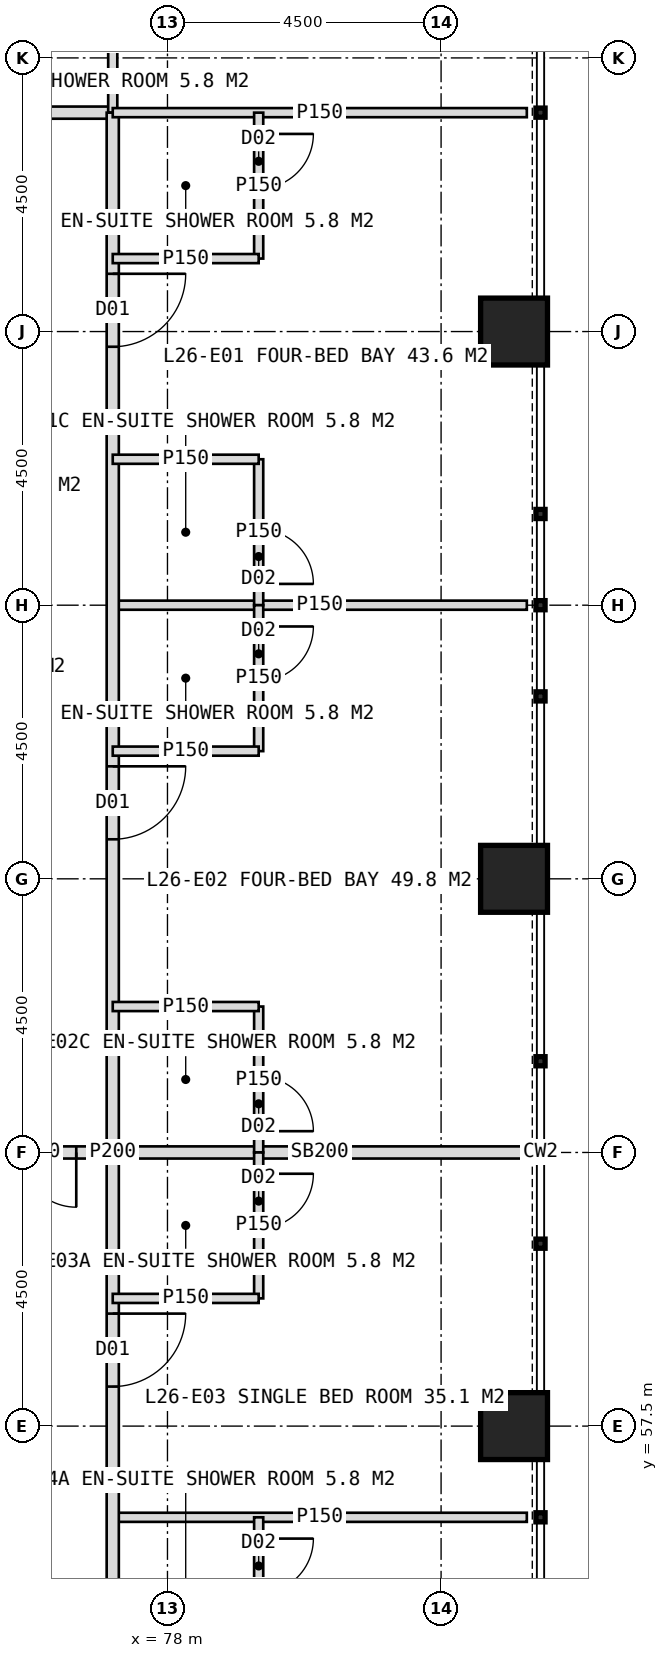
"""IFC4 building model, lengths in metres.
Left out: names, types, materials, properties, quantities, classifications, styles, units other than length and angle.
Written with IfcOpenShell. Run it as: python <this file> out.ifc"""

import sys

from ifc_helpers import new_model, si_unit, direction, frame, frame_2d, origin, origin_2d, place, context, subcontext, project, spatial, rectangle, hollow_rectangle, extrude, element, fill, save


model = new_model("IFC4")
c1 = context("Model", 3, precision=1e-05, world=origin(), true_north=direction((0.0, 1.0)))
c2 = subcontext(c1, "Body", "Model", "MODEL_VIEW")
j1 = project(units=[si_unit("LENGTHUNIT", "METRE"), si_unit("PLANEANGLEUNIT", "RADIAN")], contexts=[c1])
p1 = place(None, origin())
s1 = spatial("IfcSite", under=j1, at=p1, CompositionType="ELEMENT")
p2 = place(p1, origin())
s2 = spatial("IfcBuilding", under=s1, at=p2, CompositionType="ELEMENT")
p3 = place(p2, frame((0.0, 0.0, 112.0)))
s3 = spatial("IfcBuildingStorey", under=s2, at=p3, CompositionType="ELEMENT", Elevation=112.0)
for number, where, z_axis, x_axis in (
    (1, (83.7, 57.5, 0.0), (0.0, 0.0, 1.0), (1.0, 0.0, 0.0)),
    (2, (83.7, 66.5, 0.0), (0.0, 0.0, 1.0), (1.0, 0.0, 0.0)),
    (3, (83.7, 75.5, 0.0), (0.0, 0.0, 1.0), (1.0, 0.0, 0.0)),
):
    element("IfcColumn", number, at=place(p3, frame(where, z_axis=z_axis, x_axis=x_axis)), inside=s3, PredefinedType="COLUMN", context=c2, shape_type="SweptSolid", body=[
        extrude(hollow_rectangle(XDim=1.1, YDim=1.1, WallThickness=0.1, at=origin_2d()), origin(), (0.0, 0.0, 1.0), 4.0),
    ])
p4 = place(p3, frame((42.9, 79.1, 0.0), z_axis=(0.0, 0.0, 1.0), x_axis=(1.0, 0.0, 0.0)))
e4 = element("IfcWall", 4, at=p4, inside=s3, PredefinedType="PARTITIONING", context=c2, shape_type="SweptSolid", body=[
    extrude(rectangle(XDim=34.2, YDim=0.2, at=frame_2d((17.1, 0.0))), origin(), (0.0, 0.0, 1.0), 3.75),
])
p5 = place(p4, frame((3.25, 0.0, 0.0)))
e5 = element("IfcOpeningElement", 5, at=p5, cuts=e4, PredefinedType="OPENING", context=c2, shape_type="SweptSolid", body=[
    extrude(rectangle(XDim=1.2, YDim=2.2, at=frame_2d((0.6, 1.1))), frame((0.0, 0.11, 0.0), z_axis=(0.0, -1.0, 0.0), x_axis=(1.0, 0.0, 0.0)), (0.0, 0.0, 1.0), 0.22),
])
p6 = place(p4, frame((9.25, 0.0, 0.0)))
e6 = element("IfcOpeningElement", 6, at=p6, cuts=e4, PredefinedType="OPENING", context=c2, shape_type="SweptSolid", body=[
    extrude(rectangle(XDim=1.2, YDim=2.2, at=frame_2d((0.6, 1.1))), frame((0.0, 0.11, 0.0), z_axis=(0.0, -1.0, 0.0), x_axis=(1.0, 0.0, 0.0)), (0.0, 0.0, 1.0), 0.22),
])
p7 = place(p4, frame((13.75, 0.0, 0.0)))
e7 = element("IfcOpeningElement", 7, at=p7, cuts=e4, PredefinedType="OPENING", context=c2, shape_type="SweptSolid", body=[
    extrude(rectangle(XDim=1.2, YDim=2.2, at=frame_2d((0.6, 1.1))), frame((0.0, 0.11, 0.0), z_axis=(0.0, -1.0, 0.0), x_axis=(1.0, 0.0, 0.0)), (0.0, 0.0, 1.0), 0.22),
])
p8 = place(p4, frame((19.6, 0.0, 0.0)))
e8 = element("IfcOpeningElement", 8, at=p8, cuts=e4, PredefinedType="OPENING", context=c2, shape_type="SweptSolid", body=[
    extrude(rectangle(XDim=1.0, YDim=2.1, at=frame_2d((0.5, 1.05))), frame((0.0, 0.11, 0.0), z_axis=(0.0, -1.0, 0.0), x_axis=(1.0, 0.0, 0.0)), (0.0, 0.0, 1.0), 0.22),
])
p9 = place(p4, frame((27.25, 0.0, 0.0)))
e9 = element("IfcOpeningElement", 9, at=p9, cuts=e4, PredefinedType="OPENING", context=c2, shape_type="SweptSolid", body=[
    extrude(rectangle(XDim=1.2, YDim=2.2, at=frame_2d((0.6, 1.1))), frame((0.0, 0.11, 0.0), z_axis=(0.0, -1.0, 0.0), x_axis=(1.0, 0.0, 0.0)), (0.0, 0.0, 1.0), 0.22),
])
p10 = place(p3, frame((77.1, 79.1, 0.0), z_axis=(0.0, 0.0, 1.0), x_axis=(0.0, 1.0, 0.0)))
e10 = element("IfcWall", 10, at=p10, inside=s3, PredefinedType="PARTITIONING", context=c2, shape_type="SweptSolid", body=[
    extrude(rectangle(XDim=2.4, YDim=0.15, at=frame_2d((1.2, 0.0))), origin(), (0.0, 0.0, 1.0), 3.75),
])
p11 = place(p3, frame((77.1, 71.0, 0.0), z_axis=(0.0, 0.0, 1.0), x_axis=(1.0, 0.0, 0.0)))
e11 = element("IfcWall", 11, at=p11, inside=s3, PredefinedType="PARTITIONING", context=c2, shape_type="SweptSolid", body=[
    extrude(rectangle(XDim=6.81, YDim=0.15, at=frame_2d((3.405, 0.0))), origin(), (0.0, 0.0, 1.0), 3.75),
])
p12 = place(p3, frame((77.1, 62.0, 0.0), z_axis=(0.0, 0.0, 1.0), x_axis=(1.0, 0.0, 0.0)))
e12 = element("IfcWall", 12, at=p12, inside=s3, PredefinedType="SOLIDWALL", context=c2, shape_type="SweptSolid", body=[
    extrude(rectangle(XDim=6.81, YDim=0.2, at=frame_2d((3.405, 0.0))), origin(), (0.0, 0.0, 1.0), 2.95),
])
p13 = place(p3, frame((77.1, 56.0, 0.0), z_axis=(0.0, 0.0, 1.0), x_axis=(1.0, 0.0, 0.0)))
e13 = element("IfcWall", 13, at=p13, inside=s3, PredefinedType="PARTITIONING", context=c2, shape_type="SweptSolid", body=[
    extrude(rectangle(XDim=6.81, YDim=0.15, at=frame_2d((3.405, 0.0))), origin(), (0.0, 0.0, 1.0), 3.75),
])
p14 = place(p3, frame((77.1, 79.1, 0.0), z_axis=(0.0, 0.0, 1.0), x_axis=(0.0, -1.0, 0.0)))
e14 = element("IfcWall", 14, at=p14, inside=s3, PredefinedType="PARTITIONING", context=c2, shape_type="SweptSolid", body=[
    extrude(rectangle(XDim=34.2, YDim=0.2, at=frame_2d((17.1, 0.0))), origin(), (0.0, 0.0, 1.0), 3.75),
])
p15 = place(p14, frame((2.65, 0.0, 0.0)))
e15 = element("IfcOpeningElement", 15, at=p15, cuts=e14, PredefinedType="OPENING", context=c2, shape_type="SweptSolid", body=[
    extrude(rectangle(XDim=1.2, YDim=2.2, at=frame_2d((0.6, 1.1))), frame((0.0, 0.11, 0.0), z_axis=(0.0, -1.0, 0.0), x_axis=(1.0, 0.0, 0.0)), (0.0, 0.0, 1.0), 0.22),
])
p16 = place(p14, frame((10.75, 0.0, 0.0)))
e16 = element("IfcOpeningElement", 16, at=p16, cuts=e14, PredefinedType="OPENING", context=c2, shape_type="SweptSolid", body=[
    extrude(rectangle(XDim=1.2, YDim=2.2, at=frame_2d((0.6, 1.1))), frame((0.0, 0.11, 0.0), z_axis=(0.0, -1.0, 0.0), x_axis=(1.0, 0.0, 0.0)), (0.0, 0.0, 1.0), 0.22),
])
p17 = place(p14, frame((19.75, 0.0, 0.0)))
e17 = element("IfcOpeningElement", 17, at=p17, cuts=e14, PredefinedType="OPENING", context=c2, shape_type="SweptSolid", body=[
    extrude(rectangle(XDim=1.2, YDim=2.2, at=frame_2d((0.6, 1.1))), frame((0.0, 0.11, 0.0), z_axis=(0.0, -1.0, 0.0), x_axis=(1.0, 0.0, 0.0)), (0.0, 0.0, 1.0), 0.22),
])
p18 = place(p14, frame((25.75, 0.0, 0.0)))
e18 = element("IfcOpeningElement", 18, at=p18, cuts=e14, PredefinedType="OPENING", context=c2, shape_type="SweptSolid", body=[
    extrude(rectangle(XDim=1.2, YDim=2.2, at=frame_2d((0.6, 1.1))), frame((0.0, 0.11, 0.0), z_axis=(0.0, -1.0, 0.0), x_axis=(1.0, 0.0, 0.0)), (0.0, 0.0, 1.0), 0.22),
])
p19 = place(p14, frame((30.25, 0.0, 0.0)))
e19 = element("IfcOpeningElement", 19, at=p19, cuts=e14, PredefinedType="OPENING", context=c2, shape_type="SweptSolid", body=[
    extrude(rectangle(XDim=1.2, YDim=2.2, at=frame_2d((0.6, 1.1))), frame((0.0, 0.11, 0.0), z_axis=(0.0, -1.0, 0.0), x_axis=(1.0, 0.0, 0.0)), (0.0, 0.0, 1.0), 0.22),
])
p20 = place(p3, frame((77.1, 79.1, 0.0), z_axis=(0.0, 0.0, 1.0), x_axis=(1.0, 0.0, 0.0)))
e20 = element("IfcWall", 20, at=p20, inside=s3, PredefinedType="PARTITIONING", context=c2, shape_type="SweptSolid", body=[
    extrude(rectangle(XDim=6.81, YDim=0.15, at=frame_2d((3.405, 0.0))), origin(), (0.0, 0.0, 1.0), 3.75),
])
p21 = place(p3, frame((79.5, 79.1, 0.0), z_axis=(0.0, 0.0, 1.0), x_axis=(0.0, -1.0, 0.0)))
e21 = element("IfcWall", 21, at=p21, inside=s3, PredefinedType="PARTITIONING", context=c2, shape_type="SweptSolid", body=[
    extrude(rectangle(XDim=2.4, YDim=0.15, at=frame_2d((1.2, 0.0))), origin(), (0.0, 0.0, 1.0), 3.75),
])
p22 = place(p21, frame((0.35, 0.0, 0.0)))
e22 = element("IfcOpeningElement", 22, at=p22, cuts=e21, PredefinedType="OPENING", context=c2, shape_type="SweptSolid", body=[
    extrude(rectangle(XDim=0.9, YDim=2.1, at=frame_2d((0.45, 1.05))), frame((0.0, 0.085, 0.0), z_axis=(0.0, -1.0, 0.0), x_axis=(1.0, 0.0, 0.0)), (0.0, 0.0, 1.0), 0.17),
])
p23 = place(p3, frame((77.1, 76.7, 0.0), z_axis=(0.0, 0.0, 1.0), x_axis=(1.0, 0.0, 0.0)))
e23 = element("IfcWall", 23, at=p23, inside=s3, PredefinedType="PARTITIONING", context=c2, shape_type="SweptSolid", body=[
    extrude(rectangle(XDim=2.4, YDim=0.15, at=frame_2d((1.2, 0.0))), origin(), (0.0, 0.0, 1.0), 3.75),
])
p24 = place(p3, frame((79.5, 73.4, 0.0), z_axis=(0.0, 0.0, 1.0), x_axis=(0.0, -1.0, 0.0)))
e24 = element("IfcWall", 24, at=p24, inside=s3, PredefinedType="PARTITIONING", context=c2, shape_type="SweptSolid", body=[
    extrude(rectangle(XDim=2.4, YDim=0.15, at=frame_2d((1.2, 0.0))), origin(), (0.0, 0.0, 1.0), 3.75),
])
p25 = place(p24, frame((1.15, 0.0, 0.0)))
e25 = element("IfcOpeningElement", 25, at=p25, cuts=e24, PredefinedType="OPENING", context=c2, shape_type="SweptSolid", body=[
    extrude(rectangle(XDim=0.9, YDim=2.1, at=frame_2d((0.45, 1.05))), frame((0.0, 0.085, 0.0), z_axis=(0.0, -1.0, 0.0), x_axis=(1.0, 0.0, 0.0)), (0.0, 0.0, 1.0), 0.17),
])
p26 = place(p3, frame((77.1, 73.4, 0.0), z_axis=(0.0, 0.0, 1.0), x_axis=(1.0, 0.0, 0.0)))
e26 = element("IfcWall", 26, at=p26, inside=s3, PredefinedType="PARTITIONING", context=c2, shape_type="SweptSolid", body=[
    extrude(rectangle(XDim=2.4, YDim=0.15, at=frame_2d((1.2, 0.0))), origin(), (0.0, 0.0, 1.0), 3.75),
])
p27 = place(p3, frame((79.5, 71.0, 0.0), z_axis=(0.0, 0.0, 1.0), x_axis=(0.0, -1.0, 0.0)))
e27 = element("IfcWall", 27, at=p27, inside=s3, PredefinedType="PARTITIONING", context=c2, shape_type="SweptSolid", body=[
    extrude(rectangle(XDim=2.4, YDim=0.15, at=frame_2d((1.2, 0.0))), origin(), (0.0, 0.0, 1.0), 3.75),
])
p28 = place(p27, frame((0.35, 0.0, 0.0)))
e28 = element("IfcOpeningElement", 28, at=p28, cuts=e27, PredefinedType="OPENING", context=c2, shape_type="SweptSolid", body=[
    extrude(rectangle(XDim=0.9, YDim=2.1, at=frame_2d((0.45, 1.05))), frame((0.0, 0.085, 0.0), z_axis=(0.0, -1.0, 0.0), x_axis=(1.0, 0.0, 0.0)), (0.0, 0.0, 1.0), 0.17),
])
p29 = place(p3, frame((77.1, 68.6, 0.0), z_axis=(0.0, 0.0, 1.0), x_axis=(1.0, 0.0, 0.0)))
e29 = element("IfcWall", 29, at=p29, inside=s3, PredefinedType="PARTITIONING", context=c2, shape_type="SweptSolid", body=[
    extrude(rectangle(XDim=2.4, YDim=0.15, at=frame_2d((1.2, 0.0))), origin(), (0.0, 0.0, 1.0), 3.75),
])
p30 = place(p3, frame((79.5, 64.4, 0.0), z_axis=(0.0, 0.0, 1.0), x_axis=(0.0, -1.0, 0.0)))
e30 = element("IfcWall", 30, at=p30, inside=s3, PredefinedType="PARTITIONING", context=c2, shape_type="SweptSolid", body=[
    extrude(rectangle(XDim=2.4, YDim=0.15, at=frame_2d((1.2, 0.0))), origin(), (0.0, 0.0, 1.0), 3.75),
])
p31 = place(p30, frame((1.15, 0.0, 0.0)))
e31 = element("IfcOpeningElement", 31, at=p31, cuts=e30, PredefinedType="OPENING", context=c2, shape_type="SweptSolid", body=[
    extrude(rectangle(XDim=0.9, YDim=2.1, at=frame_2d((0.45, 1.05))), frame((0.0, 0.085, 0.0), z_axis=(0.0, -1.0, 0.0), x_axis=(1.0, 0.0, 0.0)), (0.0, 0.0, 1.0), 0.17),
])
p32 = place(p3, frame((77.1, 64.4, 0.0), z_axis=(0.0, 0.0, 1.0), x_axis=(1.0, 0.0, 0.0)))
e32 = element("IfcWall", 32, at=p32, inside=s3, PredefinedType="PARTITIONING", context=c2, shape_type="SweptSolid", body=[
    extrude(rectangle(XDim=2.4, YDim=0.15, at=frame_2d((1.2, 0.0))), origin(), (0.0, 0.0, 1.0), 3.75),
])
p33 = place(p3, frame((79.5, 62.0, 0.0), z_axis=(0.0, 0.0, 1.0), x_axis=(0.0, -1.0, 0.0)))
e33 = element("IfcWall", 33, at=p33, inside=s3, PredefinedType="PARTITIONING", context=c2, shape_type="SweptSolid", body=[
    extrude(rectangle(XDim=2.4, YDim=0.15, at=frame_2d((1.2, 0.0))), origin(), (0.0, 0.0, 1.0), 3.75),
])
p34 = place(p33, frame((0.35, 0.0, 0.0)))
e34 = element("IfcOpeningElement", 34, at=p34, cuts=e33, PredefinedType="OPENING", context=c2, shape_type="SweptSolid", body=[
    extrude(rectangle(XDim=0.9, YDim=2.1, at=frame_2d((0.45, 1.05))), frame((0.0, 0.085, 0.0), z_axis=(0.0, -1.0, 0.0), x_axis=(1.0, 0.0, 0.0)), (0.0, 0.0, 1.0), 0.17),
])
p35 = place(p3, frame((77.1, 59.6, 0.0), z_axis=(0.0, 0.0, 1.0), x_axis=(1.0, 0.0, 0.0)))
e35 = element("IfcWall", 35, at=p35, inside=s3, PredefinedType="PARTITIONING", context=c2, shape_type="SweptSolid", body=[
    extrude(rectangle(XDim=2.4, YDim=0.15, at=frame_2d((1.2, 0.0))), origin(), (0.0, 0.0, 1.0), 3.75),
])
p36 = place(p3, frame((79.5, 56.0, 0.0), z_axis=(0.0, 0.0, 1.0), x_axis=(0.0, -1.0, 0.0)))
e36 = element("IfcWall", 36, at=p36, inside=s3, PredefinedType="PARTITIONING", context=c2, shape_type="SweptSolid", body=[
    extrude(rectangle(XDim=2.4, YDim=0.15, at=frame_2d((1.2, 0.0))), origin(), (0.0, 0.0, 1.0), 3.75),
])
p37 = place(p36, frame((0.35, 0.0, 0.0)))
e37 = element("IfcOpeningElement", 37, at=p37, cuts=e36, PredefinedType="OPENING", context=c2, shape_type="SweptSolid", body=[
    extrude(rectangle(XDim=0.9, YDim=2.1, at=frame_2d((0.45, 1.05))), frame((0.0, 0.085, 0.0), z_axis=(0.0, -1.0, 0.0), x_axis=(1.0, 0.0, 0.0)), (0.0, 0.0, 1.0), 0.17),
])
p38 = place(p3, frame((74.4, 62.0, 0.0), z_axis=(0.0, 0.0, 1.0), x_axis=(1.0, 0.0, 0.0)))
e38 = element("IfcWall", 38, at=p38, inside=s3, PredefinedType="SOLIDWALL", context=c2, shape_type="SweptSolid", body=[
    extrude(rectangle(XDim=2.7, YDim=0.2, at=frame_2d((1.35, 0.0))), origin(), (0.0, 0.0, 1.0), 2.95),
])
p39 = place(p38, frame((0.3, 0.0, 0.0)))
e39 = element("IfcOpeningElement", 39, at=p39, cuts=e38, PredefinedType="OPENING", context=c2, shape_type="SweptSolid", body=[
    extrude(rectangle(XDim=1.8, YDim=2.2, at=frame_2d((0.9, 1.1))), frame((0.0, 0.11, 0.0), z_axis=(0.0, -1.0, 0.0), x_axis=(1.0, 0.0, 0.0)), (0.0, 0.0, 1.0), 0.22),
])
p40 = place(p15, origin())
e40 = element("IfcDoor", 40, at=p40, inside=s3, OperationType="SINGLE_SWING_LEFT", PredefinedType="DOOR", context=c2, shape_type="SweptSolid", body=[
    extrude(rectangle(XDim=1.2, YDim=2.2, at=frame_2d((0.6, 1.1))), frame((0.0, 0.025, 0.0), z_axis=(0.0, -1.0, 0.0), x_axis=(1.0, 0.0, 0.0)), (0.0, 0.0, 1.0), 0.05),
])
fill(e15, e40)
p41 = place(p22, origin())
e41 = element("IfcDoor", 41, at=p41, inside=s3, OperationType="SINGLE_SWING_LEFT", PredefinedType="DOOR", context=c2, shape_type="SweptSolid", body=[
    extrude(rectangle(XDim=0.9, YDim=2.1, at=frame_2d((0.45, 1.05))), frame((0.0, 0.025, 0.0), z_axis=(0.0, -1.0, 0.0), x_axis=(1.0, 0.0, 0.0)), (0.0, 0.0, 1.0), 0.05),
])
fill(e22, e41)
p42 = place(p25, origin())
e42 = element("IfcDoor", 42, at=p42, inside=s3, OperationType="SINGLE_SWING_RIGHT", PredefinedType="DOOR", context=c2, shape_type="SweptSolid", body=[
    extrude(rectangle(XDim=0.9, YDim=2.1, at=frame_2d((0.45, 1.05))), frame((0.0, 0.025, 0.0), z_axis=(0.0, -1.0, 0.0), x_axis=(1.0, 0.0, 0.0)), (0.0, 0.0, 1.0), 0.05),
])
fill(e25, e42)
p43 = place(p16, origin())
e43 = element("IfcDoor", 43, at=p43, inside=s3, OperationType="SINGLE_SWING_LEFT", PredefinedType="DOOR", context=c2, shape_type="SweptSolid", body=[
    extrude(rectangle(XDim=1.2, YDim=2.2, at=frame_2d((0.6, 1.1))), frame((0.0, 0.025, 0.0), z_axis=(0.0, -1.0, 0.0), x_axis=(1.0, 0.0, 0.0)), (0.0, 0.0, 1.0), 0.05),
])
fill(e16, e43)
p44 = place(p28, origin())
e44 = element("IfcDoor", 44, at=p44, inside=s3, OperationType="SINGLE_SWING_LEFT", PredefinedType="DOOR", context=c2, shape_type="SweptSolid", body=[
    extrude(rectangle(XDim=0.9, YDim=2.1, at=frame_2d((0.45, 1.05))), frame((0.0, 0.025, 0.0), z_axis=(0.0, -1.0, 0.0), x_axis=(1.0, 0.0, 0.0)), (0.0, 0.0, 1.0), 0.05),
])
fill(e28, e44)
p45 = place(p31, origin())
e45 = element("IfcDoor", 45, at=p45, inside=s3, OperationType="SINGLE_SWING_RIGHT", PredefinedType="DOOR", context=c2, shape_type="SweptSolid", body=[
    extrude(rectangle(XDim=0.9, YDim=2.1, at=frame_2d((0.45, 1.05))), frame((0.0, 0.025, 0.0), z_axis=(0.0, -1.0, 0.0), x_axis=(1.0, 0.0, 0.0)), (0.0, 0.0, 1.0), 0.05),
])
fill(e31, e45)
p46 = place(p17, origin())
e46 = element("IfcDoor", 46, at=p46, inside=s3, OperationType="SINGLE_SWING_LEFT", PredefinedType="DOOR", context=c2, shape_type="SweptSolid", body=[
    extrude(rectangle(XDim=1.2, YDim=2.2, at=frame_2d((0.6, 1.1))), frame((0.0, 0.025, 0.0), z_axis=(0.0, -1.0, 0.0), x_axis=(1.0, 0.0, 0.0)), (0.0, 0.0, 1.0), 0.05),
])
fill(e17, e46)
p47 = place(p34, origin())
e47 = element("IfcDoor", 47, at=p47, inside=s3, OperationType="SINGLE_SWING_LEFT", PredefinedType="DOOR", context=c2, shape_type="SweptSolid", body=[
    extrude(rectangle(XDim=0.9, YDim=2.1, at=frame_2d((0.45, 1.05))), frame((0.0, 0.025, 0.0), z_axis=(0.0, -1.0, 0.0), x_axis=(1.0, 0.0, 0.0)), (0.0, 0.0, 1.0), 0.05),
])
fill(e34, e47)
p48 = place(p37, origin())
e48 = element("IfcDoor", 48, at=p48, inside=s3, OperationType="SINGLE_SWING_LEFT", PredefinedType="DOOR", context=c2, shape_type="SweptSolid", body=[
    extrude(rectangle(XDim=0.9, YDim=2.1, at=frame_2d((0.45, 1.05))), frame((0.0, 0.025, 0.0), z_axis=(0.0, -1.0, 0.0), x_axis=(1.0, 0.0, 0.0)), (0.0, 0.0, 1.0), 0.05),
])
fill(e37, e48)
p49 = place(p39, origin())
e49 = element("IfcDoor", 49, at=p49, inside=s3, OperationType="DOUBLE_DOOR_DOUBLE_SWING", PredefinedType="DOOR", context=c2, shape_type="SweptSolid", body=[
    extrude(rectangle(XDim=1.8, YDim=2.2, at=frame_2d((0.9, 1.1))), frame((0.0, 0.025, 0.0), z_axis=(0.0, -1.0, 0.0), x_axis=(1.0, 0.0, 0.0)), (0.0, 0.0, 1.0), 0.05),
])
fill(e39, e49)
save(model, sys.argv[1])
